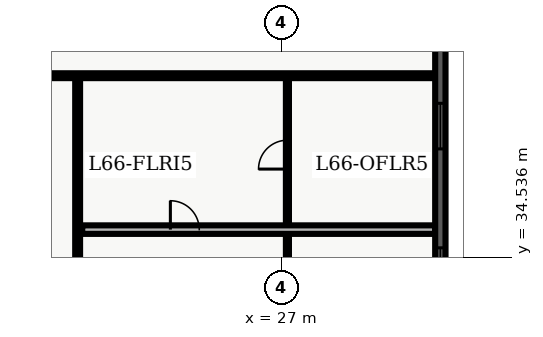
"""IFC4 building model, lengths in metres.
Left out: names, types, materials, properties, quantities, classifications, styles, units other than length and angle.
Written with IfcOpenShell. Run it as: python <this file> out.ifc"""

import sys

from ifc_helpers import new_model, entity, si_unit, converted_unit, direction, frame, origin_with_axes, origin_2d_with_axis, place, context, subcontext, project, spatial, polyline, rectangle, outline, extrude, element, fill, save


model = new_model("IFC4")
c1 = context("Model", 3, precision=1e-05, world=origin_with_axes(), true_north=direction((0.0, 1.0)))
c2 = subcontext(c1, "Body", "Model", "MODEL_VIEW")
j1 = project(units=[si_unit("LENGTHUNIT", "METRE"), converted_unit("PLANEANGLEUNIT", "DEGREE", entity("IfcPlaneAngleMeasure", 0.017), si_unit("PLANEANGLEUNIT", "RADIAN"), dimensions=[0, 0, 0, 0, 0, 0, 0])], contexts=[c1])
p1 = place(None, origin_with_axes())
s1 = spatial("IfcSite", under=j1, at=p1, CompositionType="ELEMENT")
p2 = place(p1, origin_with_axes())
s2 = spatial("IfcBuilding", under=s1, at=p2, CompositionType="ELEMENT")
p3 = place(p2, frame((0.0, 0.0, 268.5), z_axis=(0.0, 0.0, 1.0), x_axis=(1.0, 0.0, 0.0)))
s3 = spatial("IfcBuildingStorey", under=s2, at=p3, CompositionType="ELEMENT", Elevation=268.5)
p4 = place(p3, frame((8.135, 40.5, 0.0), z_axis=(0.0, 0.0, 1.0), x_axis=(1.0, 0.0, 0.0)))
e1 = element("IfcWall", 1, at=p4, inside=s3, PredefinedType="PARTITIONING", context=c2, shape_type="SweptSolid", body=[
    extrude(outline(polyline([(0.0, -0.08), (23.93, -0.08), (23.93, 0.08), (0.0, 0.08), (0.0, -0.08)])), origin_with_axes(), (0.0, 0.0, 1.0), 2.7),
])
p5 = place(p4, frame((0.76, 0.0, 0.0), z_axis=(0.0, 0.0, 1.0), x_axis=(1.0, 0.0, 0.0)))
e2 = element("IfcOpeningElement", 2, at=p5, cuts=e1, PredefinedType="OPENING", context=c2, shape_type="SweptSolid", body=[
    extrude(rectangle(XDim=1.0, YDim=0.18, at=origin_2d_with_axis()), origin_with_axes(), (0.0, 0.0, 1.0), 2.15),
])
p6 = place(p4, frame((4.39, 0.0, 0.0), z_axis=(0.0, 0.0, 1.0), x_axis=(1.0, 0.0, 0.0)))
e3 = element("IfcOpeningElement", 3, at=p6, cuts=e1, PredefinedType="OPENING", context=c2, shape_type="SweptSolid", body=[
    extrude(rectangle(XDim=1.0, YDim=0.18, at=origin_2d_with_axis()), origin_with_axes(), (0.0, 0.0, 1.0), 2.15),
])
p7 = place(p4, frame((7.051, 0.0, 0.0), z_axis=(0.0, 0.0, 1.0), x_axis=(1.0, 0.0, 0.0)))
e4 = element("IfcOpeningElement", 4, at=p7, cuts=e1, PredefinedType="OPENING", context=c2, shape_type="SweptSolid", body=[
    extrude(rectangle(XDim=1.0, YDim=0.18, at=origin_2d_with_axis()), origin_with_axes(), (0.0, 0.0, 1.0), 2.15),
])
p8 = place(p4, frame((10.006, 0.0, 0.0), z_axis=(0.0, 0.0, 1.0), x_axis=(1.0, 0.0, 0.0)))
e5 = element("IfcOpeningElement", 5, at=p8, cuts=e1, PredefinedType="OPENING", context=c2, shape_type="SweptSolid", body=[
    extrude(rectangle(XDim=1.0, YDim=0.18, at=origin_2d_with_axis()), origin_with_axes(), (0.0, 0.0, 1.0), 2.15),
])
p9 = place(p3, frame((20.3, 7.8, 0.0), z_axis=(0.0, 0.0, 1.0), x_axis=(0.0, 1.0, 0.0)))
e6 = element("IfcWall", 6, at=p9, inside=s3, PredefinedType="PARTITIONING", context=c2, shape_type="SweptSolid", body=[
    extrude(outline(polyline([(0.0, -0.08), (32.7, -0.08), (32.7, 0.08), (0.0, 0.08), (0.0, -0.08)])), origin_with_axes(), (0.0, 0.0, 1.0), 2.7),
])
p10 = place(p9, frame((14.2, 0.0, 0.0), z_axis=(0.0, 0.0, 1.0), x_axis=(1.0, 0.0, 0.0)))
e7 = element("IfcOpeningElement", 7, at=p10, cuts=e6, PredefinedType="OPENING", context=c2, shape_type="SweptSolid", body=[
    extrude(rectangle(XDim=1.0, YDim=0.18, at=origin_2d_with_axis()), origin_with_axes(), (0.0, 0.0, 1.0), 2.15),
])
p11 = place(p9, frame((18.215, 0.0, 0.0), z_axis=(0.0, 0.0, 1.0), x_axis=(1.0, 0.0, 0.0)))
e8 = element("IfcOpeningElement", 8, at=p11, cuts=e6, PredefinedType="OPENING", context=c2, shape_type="SweptSolid", body=[
    extrude(rectangle(XDim=1.0, YDim=0.18, at=origin_2d_with_axis()), origin_with_axes(), (0.0, 0.0, 1.0), 2.15),
])
p12 = place(p9, frame((22.221, 0.0, 0.0), z_axis=(0.0, 0.0, 1.0), x_axis=(1.0, 0.0, 0.0)))
e9 = element("IfcOpeningElement", 9, at=p12, cuts=e6, PredefinedType="OPENING", context=c2, shape_type="SweptSolid", body=[
    extrude(rectangle(XDim=1.0, YDim=0.18, at=origin_2d_with_axis()), origin_with_axes(), (0.0, 0.0, 1.0), 2.15),
])
p13 = place(p9, frame((25.553, 0.0, 0.0), z_axis=(0.0, 0.0, 1.0), x_axis=(1.0, 0.0, 0.0)))
e10 = element("IfcOpeningElement", 10, at=p13, cuts=e6, PredefinedType="OPENING", context=c2, shape_type="SweptSolid", body=[
    extrude(rectangle(XDim=1.0, YDim=0.18, at=origin_2d_with_axis()), origin_with_axes(), (0.0, 0.0, 1.0), 2.15),
])
p14 = place(p9, frame((5.475, 0.0, 0.0), z_axis=(0.0, 0.0, 1.0), x_axis=(1.0, 0.0, 0.0)))
e11 = element("IfcOpeningElement", 11, at=p14, cuts=e6, PredefinedType="OPENING", context=c2, shape_type="SweptSolid", body=[
    extrude(rectangle(XDim=1.05, YDim=0.18, at=origin_2d_with_axis()), origin_with_axes(), (0.0, 0.0, 1.0), 2.15),
])
p15 = place(p3, frame((27.2, 21.4, 0.0), z_axis=(0.0, 0.0, 1.0), x_axis=(0.0, 1.0, 0.0)))
e12 = element("IfcWall", 12, at=p15, inside=s3, PredefinedType="PARTITIONING", context=c2, shape_type="SweptSolid", body=[
    extrude(outline(polyline([(0.0, -0.05), (18.9, -0.05), (18.9, 0.05), (0.0, 0.05), (0.0, -0.05)])), origin_with_axes(), (0.0, 0.0, 1.0), 2.7),
])
p16 = place(p15, frame((1.452, 0.0, 0.0), z_axis=(0.0, 0.0, 1.0), x_axis=(1.0, 0.0, 0.0)))
e13 = element("IfcOpeningElement", 13, at=p16, cuts=e12, PredefinedType="OPENING", context=c2, shape_type="SweptSolid", body=[
    extrude(rectangle(XDim=0.95, YDim=0.12, at=origin_2d_with_axis()), origin_with_axes(), (0.0, 0.0, 1.0), 2.15),
])
p17 = place(p15, frame((4.614, 0.0, 0.0), z_axis=(0.0, 0.0, 1.0), x_axis=(1.0, 0.0, 0.0)))
e14 = element("IfcOpeningElement", 14, at=p17, cuts=e12, PredefinedType="OPENING", context=c2, shape_type="SweptSolid", body=[
    extrude(rectangle(XDim=0.95, YDim=0.12, at=origin_2d_with_axis()), origin_with_axes(), (0.0, 0.0, 1.0), 2.15),
])
p18 = place(p15, frame((8.062, 0.0, 0.0), z_axis=(0.0, 0.0, 1.0), x_axis=(1.0, 0.0, 0.0)))
e15 = element("IfcOpeningElement", 15, at=p18, cuts=e12, PredefinedType="OPENING", context=c2, shape_type="SweptSolid", body=[
    extrude(rectangle(XDim=0.95, YDim=0.12, at=origin_2d_with_axis()), origin_with_axes(), (0.0, 0.0, 1.0), 2.15),
])
p19 = place(p15, frame((11.953, 0.0, 0.0), z_axis=(0.0, 0.0, 1.0), x_axis=(1.0, 0.0, 0.0)))
e16 = element("IfcOpeningElement", 16, at=p19, cuts=e12, PredefinedType="OPENING", context=c2, shape_type="SweptSolid", body=[
    extrude(rectangle(XDim=0.95, YDim=0.12, at=origin_2d_with_axis()), origin_with_axes(), (0.0, 0.0, 1.0), 2.15),
])
p20 = place(p15, frame((16.503, 0.0, 0.0), z_axis=(0.0, 0.0, 1.0), x_axis=(1.0, 0.0, 0.0)))
e17 = element("IfcOpeningElement", 17, at=p20, cuts=e12, PredefinedType="OPENING", context=c2, shape_type="SweptSolid", body=[
    extrude(rectangle(XDim=0.95, YDim=0.12, at=origin_2d_with_axis()), origin_with_axes(), (0.0, 0.0, 1.0), 2.15),
])
p21 = place(p3, frame((20.45, 35.437, 0.0), z_axis=(0.0, 0.0, 1.0), x_axis=(1.0, 0.0, 0.0)))
e18 = element("IfcWall", 18, at=p21, inside=s3, PredefinedType="PARTITIONING", context=c2, shape_type="SweptSolid", body=[
    extrude(outline(polyline([(0.0, -0.14), (11.615, -0.14), (11.615, 0.14), (0.0, 0.14), (0.0, -0.14)])), origin_with_axes(), (0.0, 0.0, 1.0), 2.7),
])
p22 = place(p21, frame((3.375, 0.0, 0.0), z_axis=(0.0, 0.0, 1.0), x_axis=(1.0, 0.0, 0.0)))
e19 = element("IfcOpeningElement", 19, at=p22, cuts=e18, PredefinedType="OPENING", context=c2, shape_type="SweptSolid", body=[
    extrude(rectangle(XDim=0.95, YDim=0.3, at=origin_2d_with_axis()), origin_with_axes(), (0.0, 0.0, 1.0), 2.15),
])
p23 = place(p3, frame((32.23, 41.82, 0.0), z_axis=(0.0, 0.0, 1.0), x_axis=(0.0, -1.0, 0.0)))
e20 = element("IfcWall", 20, at=p23, inside=s3, PredefinedType="SOLIDWALL", context=c2, shape_type="SweptSolid", body=[
    extrude(outline(polyline([(0.0, -0.17), (20.22, -0.17), (20.22, 0.17), (0.0, 0.17), (0.0, -0.17)])), origin_with_axes(), (0.0, 0.0, 1.0), 3.66),
])
p24 = place(p23, frame((2.978, 0.0, 0.45), z_axis=(0.0, 0.0, 1.0), x_axis=(1.0, 0.0, 0.0)))
e21 = element("IfcOpeningElement", 21, at=p24, cuts=e20, PredefinedType="OPENING", context=c2, shape_type="SweptSolid", body=[
    extrude(rectangle(XDim=1.5, YDim=0.36, at=origin_2d_with_axis()), origin_with_axes(), (0.0, 0.0, 1.0), 2.1),
])
p25 = place(p23, frame((7.732, 0.0, 0.45), z_axis=(0.0, 0.0, 1.0), x_axis=(1.0, 0.0, 0.0)))
e22 = element("IfcOpeningElement", 22, at=p25, cuts=e20, PredefinedType="OPENING", context=c2, shape_type="SweptSolid", body=[
    extrude(rectangle(XDim=1.5, YDim=0.36, at=origin_2d_with_axis()), origin_with_axes(), (0.0, 0.0, 1.0), 2.1),
])
p26 = place(p23, frame((12.487, 0.0, 0.45), z_axis=(0.0, 0.0, 1.0), x_axis=(1.0, 0.0, 0.0)))
e23 = element("IfcOpeningElement", 23, at=p26, cuts=e20, PredefinedType="OPENING", context=c2, shape_type="SweptSolid", body=[
    extrude(rectangle(XDim=1.5, YDim=0.36, at=origin_2d_with_axis()), origin_with_axes(), (0.0, 0.0, 1.0), 2.1),
])
p27 = place(p15, frame((16.503, 0.0, 0.0), z_axis=(0.0, 0.0, 1.0), x_axis=(1.0, 0.0, 0.0)))
e24 = element("IfcDoor", 24, at=p27, inside=s3, OperationType="SINGLE_SWING_LEFT", PredefinedType="DOOR", context=c2, shape_type="SweptSolid", body=[
    extrude(rectangle(XDim=0.95, YDim=0.06, at=origin_2d_with_axis()), origin_with_axes(), (0.0, 0.0, 1.0), 2.15),
])
fill(e17, e24)
p28 = place(p21, frame((3.375, 0.0, 0.0), z_axis=(0.0, 0.0, 1.0), x_axis=(1.0, 0.0, 0.0)))
e25 = element("IfcDoor", 25, at=p28, inside=s3, OperationType="SINGLE_SWING_LEFT", PredefinedType="DOOR", context=c2, shape_type="SweptSolid", body=[
    extrude(rectangle(XDim=0.95, YDim=0.09, at=origin_2d_with_axis()), origin_with_axes(), (0.0, 0.0, 1.0), 2.15),
])
fill(e19, e25)
p29 = place(p23, frame((2.978, 0.0, 0.45), z_axis=(0.0, 0.0, 1.0), x_axis=(1.0, 0.0, 0.0)))
e26 = element("IfcWindow", 26, at=p29, inside=s3, PredefinedType="WINDOW", context=c2, shape_type="SweptSolid", body=[
    extrude(rectangle(XDim=1.5, YDim=0.09, at=origin_2d_with_axis()), origin_with_axes(), (0.0, 0.0, 1.0), 2.1),
])
fill(e21, e26)
p30 = place(p23, frame((7.732, 0.0, 0.45), z_axis=(0.0, 0.0, 1.0), x_axis=(1.0, 0.0, 0.0)))
e27 = element("IfcWindow", 27, at=p30, inside=s3, PredefinedType="WINDOW", context=c2, shape_type="SweptSolid", body=[
    extrude(rectangle(XDim=1.5, YDim=0.09, at=origin_2d_with_axis()), origin_with_axes(), (0.0, 0.0, 1.0), 2.1),
])
fill(e22, e27)
save(model, sys.argv[1])
